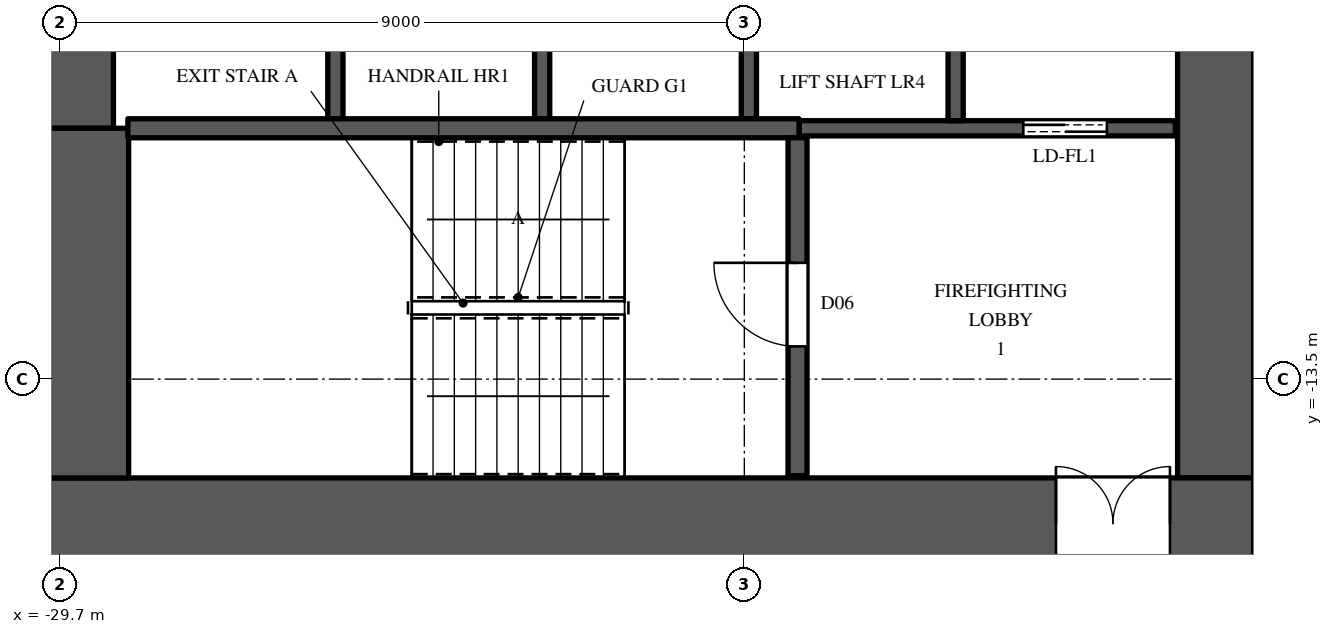
"""IFC4 building model, lengths in metres.
Left out: names, types, materials, properties, quantities, classifications, styles, units other than length and angle.
Written with IfcOpenShell. Run it as: python <this file> out.ifc"""

import sys

from ifc_helpers import new_model, si_unit, direction, frame, frame_2d, origin, place, context, subcontext, project, spatial, rectangle, extrude, element, fill, save


model = new_model("IFC4")
c1 = context("Model", 3, precision=1e-05, world=origin(), true_north=direction((0.0, 1.0)))
c2 = subcontext(c1, "Body", "Model", "MODEL_VIEW")
j1 = project(units=[si_unit("LENGTHUNIT", "METRE"), si_unit("PLANEANGLEUNIT", "RADIAN")], contexts=[c1])
p1 = place(None, origin())
s1 = spatial("IfcSite", under=j1, at=p1, CompositionType="ELEMENT")
p2 = place(p1, origin())
s2 = spatial("IfcBuilding", under=s1, at=p2, CompositionType="ELEMENT")
p3 = place(p2, frame((0.0, 0.0, 87.9)))
s3 = spatial("IfcBuildingStorey", under=s2, at=p3, CompositionType="ELEMENT", Elevation=87.9)
p4 = place(p3, frame((-30.0, -15.4, 0.0), z_axis=(0.0, 0.0, 1.0), x_axis=(1.0, 0.0, 0.0)))
e1 = element("IfcWall", 1, at=p4, inside=s3, PredefinedType="SHEAR", context=c2, shape_type="SweptSolid", body=[
    extrude(rectangle(XDim=16.0, YDim=1.2, at=frame_2d((8.0, 0.0))), origin(), (0.0, 0.0, 1.0), 3.6),
])
p5 = place(p4, frame((13.4, 0.0, 0.0)))
e2 = element("IfcOpeningElement", 2, at=p5, cuts=e1, PredefinedType="OPENING", context=c2, shape_type="SweptSolid", body=[
    extrude(rectangle(XDim=1.5, YDim=2.4, at=frame_2d((0.75, 1.2))), frame((0.0, 0.61, 0.0), z_axis=(0.0, -1.0, 0.0), x_axis=(1.0, 0.0, 0.0)), (0.0, 0.0, 1.0), 1.22),
])
p6 = place(p3, frame((-14.5, -14.8, 0.0), z_axis=(0.0, 0.0, 1.0), x_axis=(0.0, 1.0, 0.0)))
e3 = element("IfcWall", 3, at=p6, inside=s3, PredefinedType="SHEAR", context=c2, shape_type="SweptSolid", body=[
    extrude(rectangle(XDim=29.6, YDim=1.0, at=frame_2d((14.8, 0.0))), origin(), (0.0, 0.0, 1.0), 3.6),
])
p7 = place(p6, frame((8.45, 0.0, 0.0)))
e4 = element("IfcOpeningElement", 4, at=p7, cuts=e3, PredefinedType="OPENING", context=c2, shape_type="SweptSolid", body=[
    extrude(rectangle(XDim=1.5, YDim=2.4, at=frame_2d((0.75, 1.2))), frame((0.0, 0.51, 0.0), z_axis=(0.0, -1.0, 0.0), x_axis=(1.0, 0.0, 0.0)), (0.0, 0.0, 1.0), 1.02),
])
p8 = place(p6, frame((19.65, 0.0, 0.0)))
e5 = element("IfcOpeningElement", 5, at=p8, cuts=e3, PredefinedType="OPENING", context=c2, shape_type="SweptSolid", body=[
    extrude(rectangle(XDim=1.5, YDim=2.4, at=frame_2d((0.75, 1.2))), frame((0.0, 0.51, 0.0), z_axis=(0.0, -1.0, 0.0), x_axis=(1.0, 0.0, 0.0)), (0.0, 0.0, 1.0), 1.02),
])
p9 = place(p6, frame((14.5, 0.0, 0.0)))
e6 = element("IfcOpeningElement", 6, at=p9, cuts=e3, PredefinedType="OPENING", context=c2, shape_type="SweptSolid", body=[
    extrude(rectangle(XDim=0.6, YDim=2.0, at=frame_2d((0.3, 1.0))), frame((0.0, 0.51, 0.0), z_axis=(0.0, -1.0, 0.0), x_axis=(1.0, 0.0, 0.0)), (0.0, 0.0, 1.0), 1.02),
])
p10 = place(p3, frame((-29.5, -10.2, 0.0), z_axis=(0.0, 0.0, 1.0), x_axis=(0.0, 1.0, 0.0)))
e7 = element("IfcWall", 7, at=p10, inside=s3, PredefinedType="SHEAR", context=c2, shape_type="SweptSolid", body=[
    extrude(rectangle(XDim=20.4, YDim=1.0, at=frame_2d((10.2, 0.0))), origin(), (0.0, 0.0, 1.0), 3.6),
])
p11 = place(p3, frame((-29.4, -14.8, 0.0), z_axis=(0.0, 0.0, 1.0), x_axis=(0.0, 1.0, 0.0)))
e8 = element("IfcWall", 8, at=p11, inside=s3, PredefinedType="SHEAR", context=c2, shape_type="SweptSolid", body=[
    extrude(rectangle(XDim=4.6, YDim=1.2, at=frame_2d((2.3, 0.0))), origin(), (0.0, 0.0, 1.0), 3.6),
])
for number, where, z_axis, x_axis in (
    (9, (-26.08, -10.075, 0.0), (0.0, 0.0, 1.0), (0.0, 1.0, 0.0)),
    (10, (-23.36, -10.075, 0.0), (0.0, 0.0, 1.0), (0.0, 1.0, 0.0)),
    (11, (-20.64, -10.075, 0.0), (0.0, 0.0, 1.0), (0.0, 1.0, 0.0)),
):
    element("IfcWall", number, at=place(p3, frame(where, z_axis=z_axis, x_axis=x_axis)), inside=s3, PredefinedType="SHEAR", context=c2, shape_type="SweptSolid", body=[
        extrude(rectangle(XDim=2.575, YDim=0.2, at=frame_2d((1.288, 0.0))), origin(), (0.0, 0.0, 1.0), 3.6),
    ])
p12 = place(p3, frame((-19.98, -10.2, 0.0), z_axis=(0.0, 0.0, 1.0), x_axis=(1.0, 0.0, 0.0)))
e12 = element("IfcWall", 12, at=p12, inside=s3, PredefinedType="SHEAR", context=c2, shape_type="SweptSolid", body=[
    extrude(rectangle(XDim=4.95, YDim=0.2, at=frame_2d((2.475, 0.0))), origin(), (0.0, 0.0, 1.0), 3.3),
])
p13 = place(p12, frame((2.95, 0.0, 0.0)))
e13 = element("IfcOpeningElement", 13, at=p13, cuts=e12, PredefinedType="OPENING", context=c2, shape_type="SweptSolid", body=[
    extrude(rectangle(XDim=1.1, YDim=2.2, at=frame_2d((0.55, 1.1))), frame((0.0, 0.11, 0.0), z_axis=(0.0, -1.0, 0.0), x_axis=(1.0, 0.0, 0.0)), (0.0, 0.0, 1.0), 0.22),
])
p14 = place(p3, frame((-17.92, -10.1, 0.0), z_axis=(0.0, 0.0, 1.0), x_axis=(0.0, 1.0, 0.0)))
e14 = element("IfcWall", 14, at=p14, inside=s3, PredefinedType="SHEAR", context=c2, shape_type="SweptSolid", body=[
    extrude(rectangle(XDim=2.6, YDim=0.2, at=frame_2d((1.3, 0.0))), origin(), (0.0, 0.0, 1.0), 3.6),
])
p15 = place(p3, frame((-28.81, -10.2, 0.0), z_axis=(0.0, 0.0, 1.0), x_axis=(1.0, 0.0, 0.0)))
e15 = element("IfcWall", 15, at=p15, inside=s3, PredefinedType="SHEAR", context=c2, shape_type="SweptSolid", body=[
    extrude(rectangle(XDim=8.83, YDim=0.25, at=frame_2d((4.415, 0.0))), origin(), (0.0, 0.0, 1.0), 3.3),
])
p16 = place(p3, frame((-20.0, -14.77, 0.0), z_axis=(0.0, 0.0, 1.0), x_axis=(0.0, 1.0, 0.0)))
e16 = element("IfcWall", 16, at=p16, inside=s3, PredefinedType="SHEAR", context=c2, shape_type="SweptSolid", body=[
    extrude(rectangle(XDim=4.445, YDim=0.25, at=frame_2d((2.223, 0.0))), origin(), (0.0, 0.0, 1.0), 3.3),
])
p17 = place(p16, frame((1.7, 0.0, 0.0)))
e17 = element("IfcOpeningElement", 17, at=p17, cuts=e16, PredefinedType="OPENING", context=c2, shape_type="SweptSolid", body=[
    extrude(rectangle(XDim=1.1, YDim=2.2, at=frame_2d((0.55, 1.1))), frame((0.0, 0.135, 0.0), z_axis=(0.0, -1.0, 0.0), x_axis=(1.0, 0.0, 0.0)), (0.0, 0.0, 1.0), 0.27),
])
p18 = place(p17, origin())
e18 = element("IfcDoor", 18, at=p18, inside=s3, OperationType="SINGLE_SWING_RIGHT", PredefinedType="DOOR", context=c2, shape_type="SweptSolid", body=[
    extrude(rectangle(XDim=1.1, YDim=2.2, at=frame_2d((0.55, 1.1))), frame((0.0, 0.025, 0.0), z_axis=(0.0, -1.0, 0.0), x_axis=(1.0, 0.0, 0.0)), (0.0, 0.0, 1.0), 0.05),
])
fill(e17, e18)
p19 = place(p13, origin())
e19 = element("IfcDoor", 19, at=p19, inside=s3, OperationType="DOUBLE_DOOR_SLIDING", PredefinedType="DOOR", context=c2, shape_type="SweptSolid", body=[
    extrude(rectangle(XDim=1.1, YDim=2.2, at=frame_2d((0.55, 1.1))), frame((0.0, 0.025, 0.0), z_axis=(0.0, -1.0, 0.0), x_axis=(1.0, 0.0, 0.0)), (0.0, 0.0, 1.0), 0.05),
])
fill(e13, e19)
p20 = place(p5, origin())
e20 = element("IfcDoor", 20, at=p20, inside=s3, OperationType="DOUBLE_DOOR_SINGLE_SWING", PredefinedType="DOOR", context=c2, shape_type="SweptSolid", body=[
    extrude(rectangle(XDim=1.5, YDim=2.4, at=frame_2d((0.75, 1.2))), frame((0.0, 0.025, 0.0), z_axis=(0.0, -1.0, 0.0), x_axis=(1.0, 0.0, 0.0)), (0.0, 0.0, 1.0), 0.05),
])
fill(e2, e20)
save(model, sys.argv[1])
